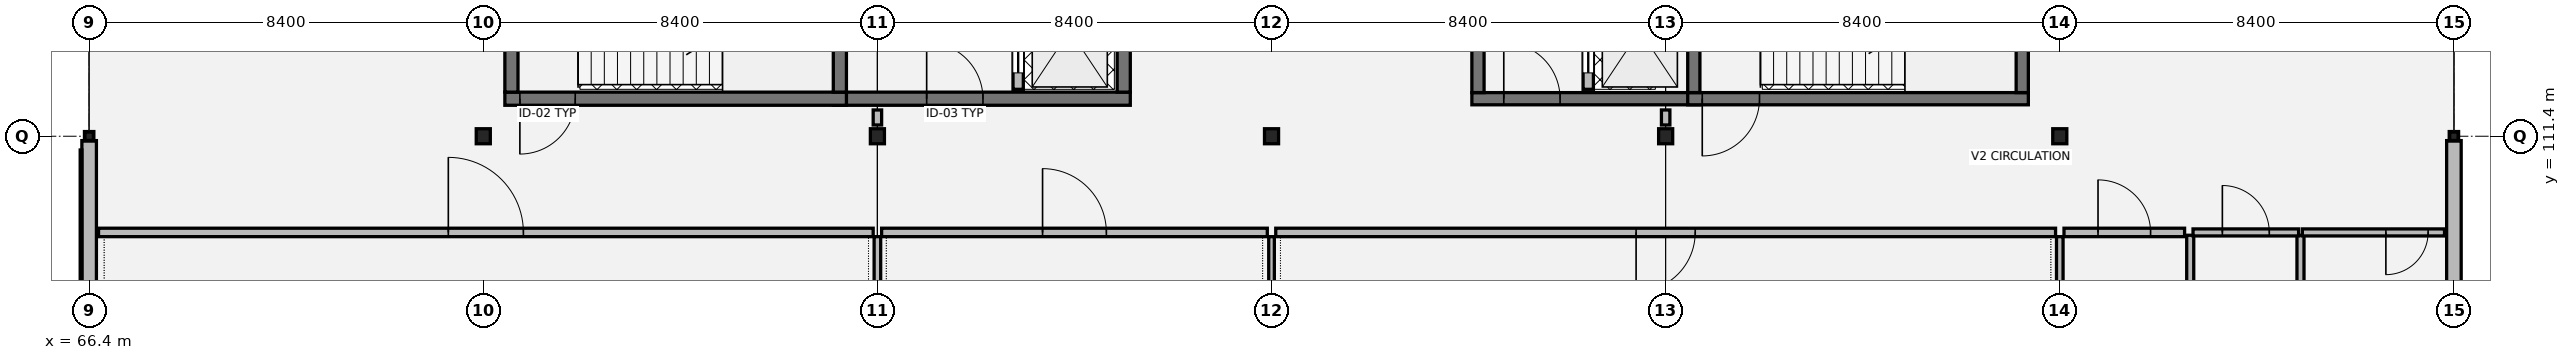
"""IFC4 building model, lengths in metres.
Left out: names, types, materials, properties, quantities, classifications, styles, units other than length and angle.
Written with IfcOpenShell. Run it as: python <this file> out.ifc"""

import sys

from ifc_helpers import new_model, si_unit, direction, frame, frame_2d, origin, origin_2d, place, context, subcontext, project, spatial, rectangle, hollow_rectangle, i_section, extrude, element, fill, save


model = new_model("IFC4")
c1 = context("Model", 3, precision=1e-05, world=origin(), true_north=direction((0.0, 1.0)))
c2 = subcontext(c1, "Body", "Model", "MODEL_VIEW")
j1 = project(units=[si_unit("LENGTHUNIT", "METRE"), si_unit("PLANEANGLEUNIT", "RADIAN")], contexts=[c1])
p1 = place(None, origin())
s1 = spatial("IfcSite", under=j1, at=p1, CompositionType="ELEMENT")
p2 = place(p1, origin())
s2 = spatial("IfcBuilding", under=s1, at=p2, CompositionType="ELEMENT")
p3 = place(p2, frame((0.0, 0.0, 17.34)))
s3 = spatial("IfcBuildingStorey", under=s2, at=p3, CompositionType="ELEMENT", Elevation=17.34)
p4 = place(p3, frame((66.4, 111.4, 0.0), z_axis=(0.0, 0.0, 1.0), x_axis=(1.0, 0.0, 0.0)))
e1 = element("IfcColumn", 1, at=p4, inside=s3, PredefinedType="COLUMN", context=c2, shape_type="SweptSolid", body=[
    extrude(hollow_rectangle(XDim=0.18, YDim=0.18, WallThickness=0.01, at=origin_2d()), origin(), (0.0, 0.0, 1.0), 3.875),
])
for number, where, z_axis, x_axis in (
    (2, (74.8, 111.4, 0.0), (0.0, 0.0, 1.0), (1.0, 0.0, 0.0)),
    (3, (83.2, 111.4, 0.0), (0.0, 0.0, 1.0), (1.0, 0.0, 0.0)),
    (4, (91.6, 111.4, 0.0), (0.0, 0.0, 1.0), (1.0, 0.0, 0.0)),
    (5, (100.0, 111.4, 0.0), (0.0, 0.0, 1.0), (1.0, 0.0, 0.0)),
    (6, (108.4, 111.4, 0.0), (0.0, 0.0, 1.0), (1.0, 0.0, 0.0)),
):
    element("IfcColumn", number, at=place(p3, frame(where, z_axis=z_axis, x_axis=x_axis)), inside=s3, PredefinedType="COLUMN", context=c2, shape_type="SweptSolid", body=[
        extrude(i_section(OverallWidth=0.3, OverallDepth=0.32, WebThickness=0.011, FlangeThickness=0.021, at=origin_2d()), origin(), (0.0, 0.0, 1.0), 4.055),
    ])
p5 = place(p3, frame((116.8, 111.4, 0.0), z_axis=(0.0, 0.0, 1.0), x_axis=(1.0, 0.0, 0.0)))
e7 = element("IfcColumn", 7, at=p5, inside=s3, PredefinedType="COLUMN", context=c2, shape_type="SweptSolid", body=[
    extrude(hollow_rectangle(XDim=0.18, YDim=0.18, WallThickness=0.01, at=origin_2d()), origin(), (0.0, 0.0, 1.0), 3.875),
])
for number, where, z_axis, x_axis in (
    (8, (116.8, 103.893, 0.0), (0.0, 0.0, 1.0), (0.0, 1.0, 0.0)),
    (9, (66.4, 111.307, 0.0), (0.0, 0.0, 1.0), (0.0, -1.0, 0.0)),
):
    element("IfcWall", number, at=place(p3, frame(where, z_axis=z_axis, x_axis=x_axis)), inside=s3, PredefinedType="SOLIDWALL", context=c2, shape_type="SweptSolid", body=[
        extrude(rectangle(XDim=7.414, YDim=0.31, at=frame_2d((3.707, 0.0))), origin(), (0.0, 0.0, 1.0), 3.48),
    ])
p6 = place(p3, frame((82.26, 112.2, 0.0), z_axis=(0.0, 0.0, 1.0), x_axis=(1.0, 0.0, 0.0)))
e10 = element("IfcWall", 10, at=p6, inside=s3, PredefinedType="SHEAR", context=c2, shape_type="SweptSolid", body=[
    extrude(rectangle(XDim=6.33, YDim=0.28, at=frame_2d((3.165, 0.0))), origin(), (0.0, 0.0, 1.0), 3.845),
])
p7 = place(p6, frame((1.99, 0.0, 0.0)))
e11 = element("IfcOpeningElement", 11, at=p7, cuts=e10, PredefinedType="OPENING", context=c2, shape_type="SweptSolid", body=[
    extrude(rectangle(XDim=1.2, YDim=2.16, at=frame_2d((0.6, 1.08))), frame((0.0, 0.15, 0.0), z_axis=(0.0, -1.0, 0.0), x_axis=(1.0, 0.0, 0.0)), (0.0, 0.0, 1.0), 0.3),
])
p8 = place(p3, frame((88.45, 112.34, 0.0), z_axis=(0.0, 0.0, 1.0), x_axis=(0.0, 1.0, 0.0)))
e12 = element("IfcWall", 12, at=p8, inside=s3, PredefinedType="SHEAR", context=c2, shape_type="SweptSolid", body=[
    extrude(rectangle(XDim=5.72, YDim=0.28, at=frame_2d((2.86, 0.0))), origin(), (0.0, 0.0, 1.0), 3.845),
])
p9 = place(p3, frame((86.2, 112.4, 0.0), z_axis=(0.0, 0.0, 1.0), x_axis=(0.0, 1.0, 0.0)))
e13 = element("IfcWall", 13, at=p9, inside=s3, PredefinedType="SOLIDWALL", context=c2, shape_type="SweptSolid", body=[
    extrude(rectangle(XDim=5.6, YDim=0.22, at=frame_2d((2.8, 0.0))), origin(), (0.0, 0.0, 1.0), 3.845),
])
p10 = place(p9, frame((0.35, 0.0, 0.0)))
e14 = element("IfcOpeningElement", 14, at=p10, cuts=e13, PredefinedType="OPENING", context=c2, shape_type="SweptSolid", body=[
    extrude(rectangle(XDim=1.1, YDim=2.15, at=frame_2d((0.55, 1.075))), frame((0.0, 0.12, 0.0), z_axis=(0.0, -1.0, 0.0), x_axis=(1.0, 0.0, 0.0)), (0.0, 0.0, 1.0), 0.24),
])
p11 = place(p9, frame((2.4, 0.0, 0.0)))
e15 = element("IfcOpeningElement", 15, at=p11, cuts=e13, PredefinedType="OPENING", context=c2, shape_type="SweptSolid", body=[
    extrude(rectangle(XDim=1.1, YDim=2.15, at=frame_2d((0.55, 1.075))), frame((0.0, 0.12, 0.0), z_axis=(0.0, -1.0, 0.0), x_axis=(1.0, 0.0, 0.0)), (0.0, 0.0, 1.0), 0.24),
])
p12 = place(p3, frame((75.26, 112.2, 0.0), z_axis=(0.0, 0.0, 1.0), x_axis=(1.0, 0.0, 0.0)))
e16 = element("IfcWall", 16, at=p12, inside=s3, PredefinedType="SHEAR", context=c2, shape_type="SweptSolid", body=[
    extrude(rectangle(XDim=7.28, YDim=0.28, at=frame_2d((3.64, 0.0))), origin(), (0.0, 0.0, 1.0), 3.845),
])
p13 = place(p12, frame((0.32, 0.0, 0.0)))
e17 = element("IfcOpeningElement", 17, at=p13, cuts=e16, PredefinedType="OPENING", context=c2, shape_type="SweptSolid", body=[
    extrude(rectangle(XDim=1.18, YDim=2.18, at=frame_2d((0.59, 1.09))), frame((0.0, 0.15, 0.0), z_axis=(0.0, -1.0, 0.0), x_axis=(1.0, 0.0, 0.0)), (0.0, 0.0, 1.0), 0.3),
])
for number, where, z_axis, x_axis in (
    (18, (75.4, 112.34, 0.0), (0.0, 0.0, 1.0), (0.0, 1.0, 0.0)),
    (19, (82.4, 112.34, 0.0), (0.0, 0.0, 1.0), (0.0, 1.0, 0.0)),
):
    element("IfcWall", number, at=place(p3, frame(where, z_axis=z_axis, x_axis=x_axis)), inside=s3, PredefinedType="SHEAR", context=c2, shape_type="SweptSolid", body=[
        extrude(rectangle(XDim=5.72, YDim=0.28, at=frame_2d((2.86, 0.0))), origin(), (0.0, 0.0, 1.0), 3.845),
    ])
p14 = place(p3, frame((95.87, 112.2, 0.0), z_axis=(0.0, 0.0, 1.0), x_axis=(1.0, 0.0, 0.0)))
e20 = element("IfcWall", 20, at=p14, inside=s3, PredefinedType="SHEAR", context=c2, shape_type="SweptSolid", body=[
    extrude(rectangle(XDim=4.86, YDim=0.26, at=frame_2d((2.43, 0.0))), origin(), (0.0, 0.0, 1.0), 3.845),
])
p15 = place(p14, frame((0.68, 0.0, 0.0)))
e21 = element("IfcOpeningElement", 21, at=p15, cuts=e20, PredefinedType="OPENING", context=c2, shape_type="SweptSolid", body=[
    extrude(rectangle(XDim=1.2, YDim=2.16, at=frame_2d((0.6, 1.08))), frame((0.0, 0.14, 0.0), z_axis=(0.0, -1.0, 0.0), x_axis=(1.0, 0.0, 0.0)), (0.0, 0.0, 1.0), 0.28),
])
p16 = place(p3, frame((96.0, 118.07, 0.0), z_axis=(0.0, 0.0, 1.0), x_axis=(0.0, -1.0, 0.0)))
e22 = element("IfcWall", 22, at=p16, inside=s3, PredefinedType="SHEAR", context=c2, shape_type="SweptSolid", body=[
    extrude(rectangle(XDim=5.74, YDim=0.26, at=frame_2d((2.87, 0.0))), origin(), (0.0, 0.0, 1.0), 3.845),
])
p17 = place(p3, frame((98.35, 112.4, 0.0), z_axis=(0.0, 0.0, 1.0), x_axis=(0.0, 1.0, 0.0)))
e23 = element("IfcWall", 23, at=p17, inside=s3, PredefinedType="SOLIDWALL", context=c2, shape_type="SweptSolid", body=[
    extrude(rectangle(XDim=5.6, YDim=0.22, at=frame_2d((2.8, 0.0))), origin(), (0.0, 0.0, 1.0), 3.845),
])
p18 = place(p17, frame((0.35, 0.0, 0.0)))
e24 = element("IfcOpeningElement", 24, at=p18, cuts=e23, PredefinedType="OPENING", context=c2, shape_type="SweptSolid", body=[
    extrude(rectangle(XDim=1.1, YDim=2.15, at=frame_2d((0.55, 1.075))), frame((0.0, 0.12, 0.0), z_axis=(0.0, -1.0, 0.0), x_axis=(1.0, 0.0, 0.0)), (0.0, 0.0, 1.0), 0.24),
])
p19 = place(p3, frame((100.47, 112.2, 0.0), z_axis=(0.0, 0.0, 1.0), x_axis=(1.0, 0.0, 0.0)))
e25 = element("IfcWall", 25, at=p19, inside=s3, PredefinedType="SHEAR", context=c2, shape_type="SweptSolid", body=[
    extrude(rectangle(XDim=7.26, YDim=0.26, at=frame_2d((3.63, 0.0))), origin(), (0.0, 0.0, 1.0), 3.845),
])
p20 = place(p19, frame((0.31, 0.0, 0.0)))
e26 = element("IfcOpeningElement", 26, at=p20, cuts=e25, PredefinedType="OPENING", context=c2, shape_type="SweptSolid", body=[
    extrude(rectangle(XDim=1.22, YDim=2.18, at=frame_2d((0.61, 1.09))), frame((0.0, 0.14, 0.0), z_axis=(0.0, -1.0, 0.0), x_axis=(1.0, 0.0, 0.0)), (0.0, 0.0, 1.0), 0.28),
])
for number, where, z_axis, x_axis in (
    (27, (100.6, 112.33, 0.0), (0.0, 0.0, 1.0), (0.0, 1.0, 0.0)),
    (28, (107.6, 112.33, 0.0), (0.0, 0.0, 1.0), (0.0, 1.0, 0.0)),
):
    element("IfcWall", number, at=place(p3, frame(where, z_axis=z_axis, x_axis=x_axis)), inside=s3, PredefinedType="SHEAR", context=c2, shape_type="SweptSolid", body=[
        extrude(rectangle(XDim=5.74, YDim=0.26, at=frame_2d((2.87, 0.0))), origin(), (0.0, 0.0, 1.0), 3.845),
    ])
for number, where, z_axis, x_axis in (
    (29, (111.18, 106.93, 0.0), (0.0, 0.0, 1.0), (0.0, 1.0, 0.0)),
    (30, (113.53, 106.93, 0.0), (0.0, 0.0, 1.0), (0.0, 1.0, 0.0)),
):
    element("IfcWall", number, at=place(p3, frame(where, z_axis=z_axis, x_axis=x_axis)), inside=s3, PredefinedType="PARTITIONING", context=c2, shape_type="SweptSolid", body=[
        extrude(rectangle(XDim=2.36, YDim=0.15, at=frame_2d((1.18, 0.0))), origin(), (0.0, 0.0, 1.0), 3.18),
    ])
p21 = place(p3, frame((111.24, 109.35, 0.0), z_axis=(0.0, 0.0, 1.0), x_axis=(1.0, 0.0, 0.0)))
e31 = element("IfcWall", 31, at=p21, inside=s3, PredefinedType="PARTITIONING", context=c2, shape_type="SweptSolid", body=[
    extrude(rectangle(XDim=2.25, YDim=0.15, at=frame_2d((1.125, 0.0))), origin(), (0.0, 0.0, 1.0), 3.18),
])
p22 = place(p21, frame((0.625, 0.0, 0.0)))
e32 = element("IfcOpeningElement", 32, at=p22, cuts=e31, PredefinedType="OPENING", context=c2, shape_type="SweptSolid", body=[
    extrude(rectangle(XDim=1.0, YDim=2.15, at=frame_2d((0.5, 1.075))), frame((0.0, 0.085, 0.0), z_axis=(0.0, -1.0, 0.0), x_axis=(1.0, 0.0, 0.0)), (0.0, 0.0, 1.0), 0.17),
])
p23 = place(p3, frame((113.57, 109.35, 0.0), z_axis=(0.0, 0.0, 1.0), x_axis=(1.0, 0.0, 0.0)))
e33 = element("IfcWall", 33, at=p23, inside=s3, PredefinedType="PARTITIONING", context=c2, shape_type="SweptSolid", body=[
    extrude(rectangle(XDim=3.03, YDim=0.15, at=frame_2d((1.515, 0.0))), origin(), (0.0, 0.0, 1.0), 3.18),
])
p24 = place(p23, frame((1.78, 0.0, 0.0)))
e34 = element("IfcOpeningElement", 34, at=p24, cuts=e33, PredefinedType="OPENING", context=c2, shape_type="SweptSolid", body=[
    extrude(rectangle(XDim=0.9, YDim=2.15, at=frame_2d((0.45, 1.075))), frame((0.0, 0.085, 0.0), z_axis=(0.0, -1.0, 0.0), x_axis=(1.0, 0.0, 0.0)), (0.0, 0.0, 1.0), 0.17),
])
p25 = place(p3, frame((66.6, 109.35, 0.0), z_axis=(0.0, 0.0, 1.0), x_axis=(1.0, 0.0, 0.0)))
e35 = element("IfcWall", 35, at=p25, inside=s3, PredefinedType="PARTITIONING", context=c2, shape_type="SweptSolid", body=[
    extrude(rectangle(XDim=16.51, YDim=0.18, at=frame_2d((8.255, 0.0))), origin(), (0.0, 0.0, 1.0), 3.18),
])
p26 = place(p25, frame((7.455, 0.0, 0.0)))
e36 = element("IfcOpeningElement", 36, at=p26, cuts=e35, PredefinedType="OPENING", context=c2, shape_type="SweptSolid", body=[
    extrude(rectangle(XDim=1.6, YDim=2.25, at=frame_2d((0.8, 1.125))), frame((0.0, 0.1, 0.0), z_axis=(0.0, -1.0, 0.0), x_axis=(1.0, 0.0, 0.0)), (0.0, 0.0, 1.0), 0.2),
])
p27 = place(p3, frame((83.29, 109.35, 0.0), z_axis=(0.0, 0.0, 1.0), x_axis=(1.0, 0.0, 0.0)))
e37 = element("IfcWall", 37, at=p27, inside=s3, PredefinedType="PARTITIONING", context=c2, shape_type="SweptSolid", body=[
    extrude(rectangle(XDim=8.22, YDim=0.18, at=frame_2d((4.11, 0.0))), origin(), (0.0, 0.0, 1.0), 3.18),
])
p28 = place(p27, frame((3.43, 0.0, 0.0)))
e38 = element("IfcOpeningElement", 38, at=p28, cuts=e37, PredefinedType="OPENING", context=c2, shape_type="SweptSolid", body=[
    extrude(rectangle(XDim=1.36, YDim=2.2, at=frame_2d((0.68, 1.1))), frame((0.0, 0.1, 0.0), z_axis=(0.0, -1.0, 0.0), x_axis=(1.0, 0.0, 0.0)), (0.0, 0.0, 1.0), 0.2),
])
p29 = place(p3, frame((91.69, 109.35, 0.0), z_axis=(0.0, 0.0, 1.0), x_axis=(1.0, 0.0, 0.0)))
e39 = element("IfcWall", 39, at=p29, inside=s3, PredefinedType="PARTITIONING", context=c2, shape_type="SweptSolid", body=[
    extrude(rectangle(XDim=16.62, YDim=0.18, at=frame_2d((8.31, 0.0))), origin(), (0.0, 0.0, 1.0), 3.18),
])
p30 = place(p29, frame((7.68, 0.0, 0.0)))
e40 = element("IfcOpeningElement", 40, at=p30, cuts=e39, PredefinedType="OPENING", context=c2, shape_type="SweptSolid", body=[
    extrude(rectangle(XDim=1.26, YDim=2.2, at=frame_2d((0.63, 1.1))), frame((0.0, 0.1, 0.0), z_axis=(0.0, -1.0, 0.0), x_axis=(1.0, 0.0, 0.0)), (0.0, 0.0, 1.0), 0.2),
])
p31 = place(p3, frame((108.49, 109.35, 0.0), z_axis=(0.0, 0.0, 1.0), x_axis=(1.0, 0.0, 0.0)))
e41 = element("IfcWall", 41, at=p31, inside=s3, PredefinedType="PARTITIONING", context=c2, shape_type="SweptSolid", body=[
    extrude(rectangle(XDim=2.57, YDim=0.18, at=frame_2d((1.285, 0.0))), origin(), (0.0, 0.0, 1.0), 3.18),
])
p32 = place(p31, frame((0.725, 0.0, 0.0)))
e42 = element("IfcOpeningElement", 42, at=p32, cuts=e41, PredefinedType="OPENING", context=c2, shape_type="SweptSolid", body=[
    extrude(rectangle(XDim=1.12, YDim=2.15, at=frame_2d((0.56, 1.075))), frame((0.0, 0.1, 0.0), z_axis=(0.0, -1.0, 0.0), x_axis=(1.0, 0.0, 0.0)), (0.0, 0.0, 1.0), 0.2),
])
for number, where, z_axis, x_axis in (
    (43, (83.2, 111.64, 0.0), (0.0, 0.0, 1.0), (0.0, 1.0, 0.0)),
    (44, (100.0, 111.64, 0.0), (0.0, 0.0, 1.0), (0.0, 1.0, 0.0)),
):
    element("IfcWall", number, at=place(p3, frame(where, z_axis=z_axis, x_axis=x_axis)), inside=s3, PredefinedType="PARTITIONING", context=c2, shape_type="SweptSolid", body=[
        extrude(rectangle(XDim=0.32, YDim=0.18, at=frame_2d((0.16, 0.0))), origin(), (0.0, 0.0, 1.0), 3.18),
    ])
p33 = place(p3, frame((83.2, 96.52, 0.0), z_axis=(0.0, 0.0, 1.0), x_axis=(0.0, 1.0, 0.0)))
e45 = element("IfcWall", 45, at=p33, inside=s3, PredefinedType="PARTITIONING", context=c2, shape_type="SweptSolid", body=[
    extrude(rectangle(XDim=12.74, YDim=0.14, at=frame_2d((6.37, 0.0))), origin(), (0.0, 0.0, 1.0), 3.18),
])
p34 = place(p3, frame((91.6, 96.52, 0.0), z_axis=(0.0, 0.0, 1.0), x_axis=(0.0, 1.0, 0.0)))
e46 = element("IfcWall", 46, at=p34, inside=s3, PredefinedType="PARTITIONING", context=c2, shape_type="SweptSolid", body=[
    extrude(rectangle(XDim=12.74, YDim=0.12, at=frame_2d((6.37, 0.0))), origin(), (0.0, 0.0, 1.0), 3.18),
])
p35 = place(p3, frame((108.4, 96.52, 0.0), z_axis=(0.0, 0.0, 1.0), x_axis=(0.0, 1.0, 0.0)))
e47 = element("IfcWall", 47, at=p35, inside=s3, PredefinedType="PARTITIONING", context=c2, shape_type="SweptSolid", body=[
    extrude(rectangle(XDim=12.74, YDim=0.14, at=frame_2d((6.37, 0.0))), origin(), (0.0, 0.0, 1.0), 3.18),
])
p36 = place(p7, origin())
e48 = element("IfcDoor", 48, at=p36, inside=s3, OperationType="SINGLE_SWING_LEFT", PredefinedType="DOOR", context=c2, shape_type="SweptSolid", body=[
    extrude(rectangle(XDim=1.2, YDim=2.16, at=frame_2d((0.6, 1.08))), frame((0.0, 0.025, 0.0), z_axis=(0.0, -1.0, 0.0), x_axis=(1.0, 0.0, 0.0)), (0.0, 0.0, 1.0), 0.05),
])
fill(e11, e48)
p37 = place(p10, origin())
e49 = element("IfcDoor", 49, at=p37, inside=s3, OperationType="SLIDING_TO_LEFT", PredefinedType="DOOR", context=c2, shape_type="SweptSolid", body=[
    extrude(rectangle(XDim=1.1, YDim=2.15, at=frame_2d((0.55, 1.075))), frame((0.0, 0.025, 0.0), z_axis=(0.0, -1.0, 0.0), x_axis=(1.0, 0.0, 0.0)), (0.0, 0.0, 1.0), 0.05),
])
fill(e14, e49)
p38 = place(p13, origin())
e50 = element("IfcDoor", 50, at=p38, inside=s3, OperationType="SINGLE_SWING_RIGHT", PredefinedType="DOOR", context=c2, shape_type="SweptSolid", body=[
    extrude(rectangle(XDim=1.18, YDim=2.18, at=frame_2d((0.59, 1.09))), frame((0.0, 0.025, 0.0), z_axis=(0.0, -1.0, 0.0), x_axis=(1.0, 0.0, 0.0)), (0.0, 0.0, 1.0), 0.05),
])
fill(e17, e50)
p39 = place(p15, origin())
e51 = element("IfcDoor", 51, at=p39, inside=s3, OperationType="SINGLE_SWING_LEFT", PredefinedType="DOOR", context=c2, shape_type="SweptSolid", body=[
    extrude(rectangle(XDim=1.2, YDim=2.16, at=frame_2d((0.6, 1.08))), frame((0.0, 0.025, 0.0), z_axis=(0.0, -1.0, 0.0), x_axis=(1.0, 0.0, 0.0)), (0.0, 0.0, 1.0), 0.05),
])
fill(e21, e51)
p40 = place(p18, origin())
e52 = element("IfcDoor", 52, at=p40, inside=s3, OperationType="SLIDING_TO_LEFT", PredefinedType="DOOR", context=c2, shape_type="SweptSolid", body=[
    extrude(rectangle(XDim=1.1, YDim=2.15, at=frame_2d((0.55, 1.075))), frame((0.0, 0.025, 0.0), z_axis=(0.0, -1.0, 0.0), x_axis=(1.0, 0.0, 0.0)), (0.0, 0.0, 1.0), 0.05),
])
fill(e24, e52)
p41 = place(p20, origin())
e53 = element("IfcDoor", 53, at=p41, inside=s3, OperationType="SINGLE_SWING_RIGHT", PredefinedType="DOOR", context=c2, shape_type="SweptSolid", body=[
    extrude(rectangle(XDim=1.22, YDim=2.18, at=frame_2d((0.61, 1.09))), frame((0.0, 0.025, 0.0), z_axis=(0.0, -1.0, 0.0), x_axis=(1.0, 0.0, 0.0)), (0.0, 0.0, 1.0), 0.05),
])
fill(e26, e53)
p42 = place(p22, origin())
e54 = element("IfcDoor", 54, at=p42, inside=s3, OperationType="SINGLE_SWING_LEFT", PredefinedType="DOOR", context=c2, shape_type="SweptSolid", body=[
    extrude(rectangle(XDim=1.0, YDim=2.15, at=frame_2d((0.5, 1.075))), frame((0.0, 0.025, 0.0), z_axis=(0.0, -1.0, 0.0), x_axis=(1.0, 0.0, 0.0)), (0.0, 0.0, 1.0), 0.05),
])
fill(e32, e54)
p43 = place(p24, origin())
e55 = element("IfcDoor", 55, at=p43, inside=s3, OperationType="SINGLE_SWING_RIGHT", PredefinedType="DOOR", context=c2, shape_type="SweptSolid", body=[
    extrude(rectangle(XDim=0.9, YDim=2.15, at=frame_2d((0.45, 1.075))), frame((0.0, 0.025, 0.0), z_axis=(0.0, -1.0, 0.0), x_axis=(1.0, 0.0, 0.0)), (0.0, 0.0, 1.0), 0.05),
])
fill(e34, e55)
p44 = place(p26, origin())
e56 = element("IfcDoor", 56, at=p44, inside=s3, OperationType="DOUBLE_DOOR_SINGLE_SWING", PredefinedType="DOOR", context=c2, shape_type="SweptSolid", body=[
    extrude(rectangle(XDim=1.6, YDim=2.25, at=frame_2d((0.8, 1.125))), frame((0.0, 0.025, 0.0), z_axis=(0.0, -1.0, 0.0), x_axis=(1.0, 0.0, 0.0)), (0.0, 0.0, 1.0), 0.05),
])
fill(e36, e56)
p45 = place(p28, origin())
e57 = element("IfcDoor", 57, at=p45, inside=s3, OperationType="SINGLE_SWING_LEFT", PredefinedType="DOOR", context=c2, shape_type="SweptSolid", body=[
    extrude(rectangle(XDim=1.36, YDim=2.2, at=frame_2d((0.68, 1.1))), frame((0.0, 0.025, 0.0), z_axis=(0.0, -1.0, 0.0), x_axis=(1.0, 0.0, 0.0)), (0.0, 0.0, 1.0), 0.05),
])
fill(e38, e57)
p46 = place(p30, origin())
e58 = element("IfcDoor", 58, at=p46, inside=s3, OperationType="SINGLE_SWING_RIGHT", PredefinedType="DOOR", context=c2, shape_type="SweptSolid", body=[
    extrude(rectangle(XDim=1.26, YDim=2.2, at=frame_2d((0.63, 1.1))), frame((0.0, 0.025, 0.0), z_axis=(0.0, -1.0, 0.0), x_axis=(1.0, 0.0, 0.0)), (0.0, 0.0, 1.0), 0.05),
])
fill(e40, e58)
p47 = place(p32, origin())
e59 = element("IfcDoor", 59, at=p47, inside=s3, OperationType="SINGLE_SWING_LEFT", PredefinedType="DOOR", context=c2, shape_type="SweptSolid", body=[
    extrude(rectangle(XDim=1.12, YDim=2.15, at=frame_2d((0.56, 1.075))), frame((0.0, 0.025, 0.0), z_axis=(0.0, -1.0, 0.0), x_axis=(1.0, 0.0, 0.0)), (0.0, 0.0, 1.0), 0.05),
])
fill(e42, e59)
save(model, sys.argv[1])
